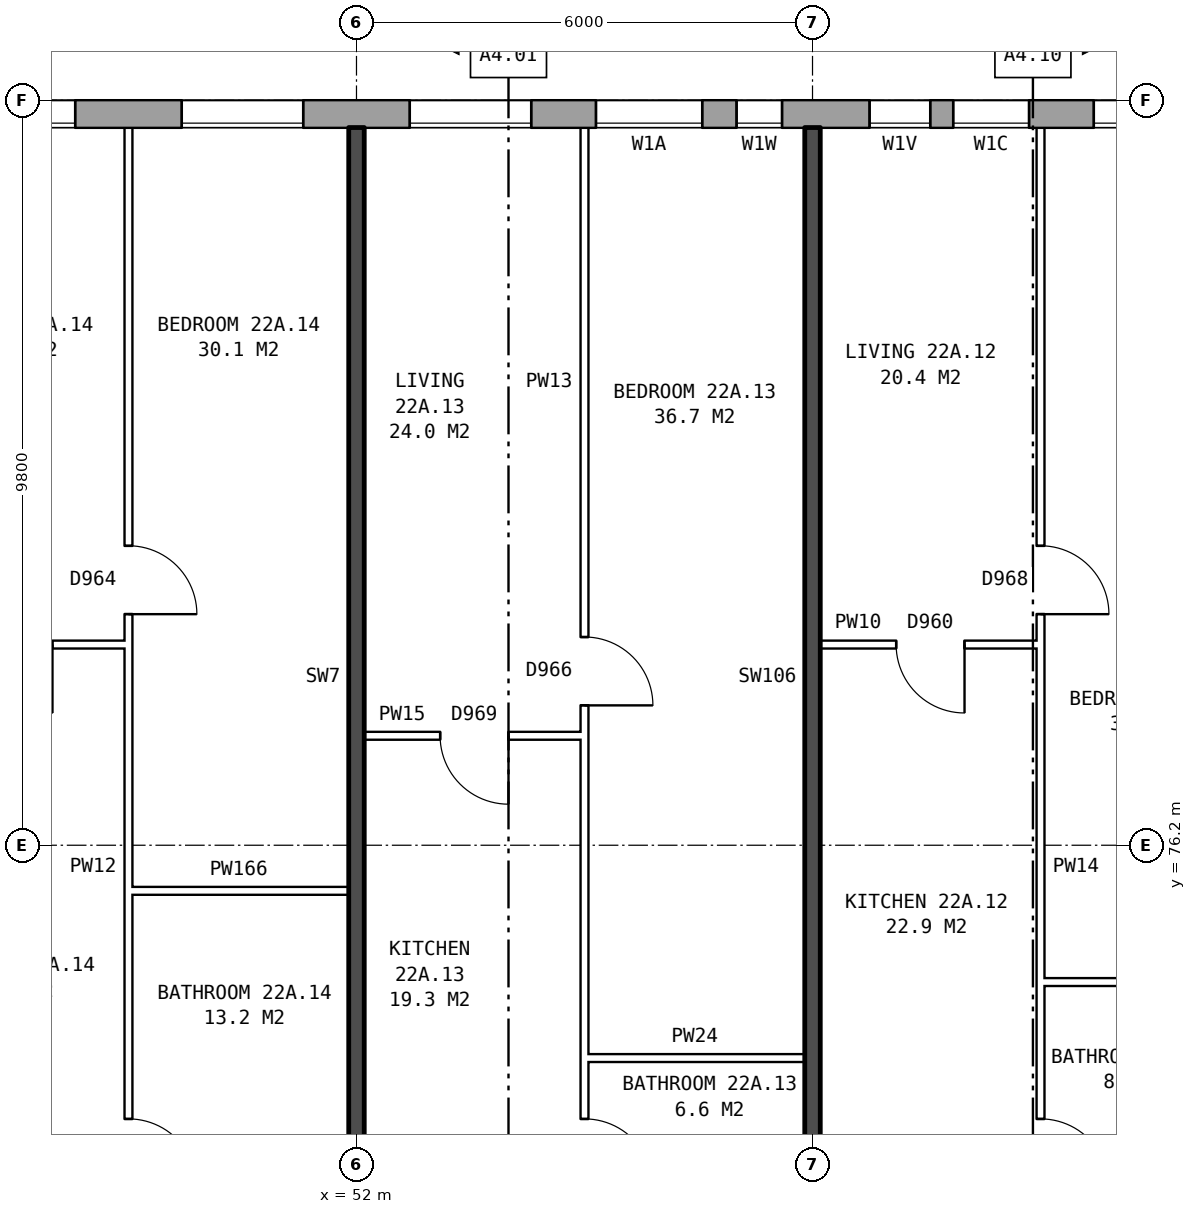
"""IFC4 building model, lengths in metres.
Left out: names, types, materials, properties, quantities, classifications, styles, units other than length and angle.
Written with IfcOpenShell. Run it as: python <this file> out.ifc"""

import sys

from ifc_helpers import new_model, si_unit, direction, frame, frame_2d, origin, place, context, subcontext, project, spatial, rectangle, extrude, element, fill, save


model = new_model("IFC4")
c1 = context("Model", 3, precision=1e-05, world=origin(), true_north=direction((0.0, 1.0)))
c2 = subcontext(c1, "Body", "Model", "MODEL_VIEW")
j1 = project(units=[si_unit("LENGTHUNIT", "METRE"), si_unit("PLANEANGLEUNIT", "RADIAN")], contexts=[c1])
p1 = place(None, origin())
s1 = spatial("IfcSite", under=j1, at=p1, CompositionType="ELEMENT")
p2 = place(p1, origin())
s2 = spatial("IfcBuilding", under=s1, at=p2, CompositionType="ELEMENT")
p3 = place(p2, frame((0.0, 0.0, 80.9)))
s3 = spatial("IfcBuildingStorey", under=s2, at=p3, CompositionType="ELEMENT", Elevation=80.9)
p4 = place(p3, frame((72.925, 85.82, 0.0), z_axis=(0.0, 0.0, 1.0), x_axis=(-1.0, 0.0, 0.0)))
e1 = element("IfcWall", 1, at=p4, inside=s3, PredefinedType="STANDARD", context=c2, shape_type="SweptSolid", body=[
    extrude(rectangle(XDim=46.601, YDim=0.36, at=frame_2d((23.3, 0.0))), origin(), (0.0, 0.0, 1.0), 2.85),
])
p5 = place(p4, frame((0.625, 0.0, 0.8)))
e2 = element("IfcOpeningElement", 2, at=p5, cuts=e1, PredefinedType="OPENING", context=c2, shape_type="SweptSolid", body=[
    extrude(rectangle(XDim=1.6, YDim=1.8, at=frame_2d((0.8, 0.9))), frame((0.0, 0.19, 0.0), z_axis=(0.0, -1.0, 0.0), x_axis=(1.0, 0.0, 0.0)), (0.0, 0.0, 1.0), 0.38),
])
p6 = place(p4, frame((3.625, 0.0, 0.8)))
e3 = element("IfcOpeningElement", 3, at=p6, cuts=e1, PredefinedType="OPENING", context=c2, shape_type="SweptSolid", body=[
    extrude(rectangle(XDim=1.6, YDim=1.8, at=frame_2d((0.8, 0.9))), frame((0.0, 0.19, 0.0), z_axis=(0.0, -1.0, 0.0), x_axis=(1.0, 0.0, 0.0)), (0.0, 0.0, 1.0), 0.38),
])
p7 = place(p4, frame((6.625, 0.0, 0.8)))
e4 = element("IfcOpeningElement", 4, at=p7, cuts=e1, PredefinedType="OPENING", context=c2, shape_type="SweptSolid", body=[
    extrude(rectangle(XDim=1.6, YDim=1.8, at=frame_2d((0.8, 0.9))), frame((0.0, 0.19, 0.0), z_axis=(0.0, -1.0, 0.0), x_axis=(1.0, 0.0, 0.0)), (0.0, 0.0, 1.0), 0.38),
])
p8 = place(p4, frame((9.625, 0.0, 0.8)))
e5 = element("IfcOpeningElement", 5, at=p8, cuts=e1, PredefinedType="OPENING", context=c2, shape_type="SweptSolid", body=[
    extrude(rectangle(XDim=1.6, YDim=1.8, at=frame_2d((0.8, 0.9))), frame((0.0, 0.19, 0.0), z_axis=(0.0, -1.0, 0.0), x_axis=(1.0, 0.0, 0.0)), (0.0, 0.0, 1.0), 0.38),
])
p9 = place(p4, frame((12.075, 0.0, 0.8)))
e6 = element("IfcOpeningElement", 6, at=p9, cuts=e1, PredefinedType="OPENING", context=c2, shape_type="SweptSolid", body=[
    extrude(rectangle(XDim=1.0, YDim=1.8, at=frame_2d((0.5, 0.9))), frame((0.0, 0.19, 0.0), z_axis=(0.0, -1.0, 0.0), x_axis=(1.0, 0.0, 0.0)), (0.0, 0.0, 1.0), 0.38),
])
p10 = place(p4, frame((15.325, 0.0, 0.65)))
e7 = element("IfcOpeningElement", 7, at=p10, cuts=e1, PredefinedType="OPENING", context=c2, shape_type="SweptSolid", body=[
    extrude(rectangle(XDim=0.6, YDim=0.9, at=frame_2d((0.3, 0.45))), frame((0.0, 0.19, 0.0), z_axis=(0.0, -1.0, 0.0), x_axis=(1.0, 0.0, 0.0)), (0.0, 0.0, 1.0), 0.38),
])
p11 = place(p4, frame((18.625, 0.0, 0.8)))
e8 = element("IfcOpeningElement", 8, at=p11, cuts=e1, PredefinedType="OPENING", context=c2, shape_type="SweptSolid", body=[
    extrude(rectangle(XDim=1.6, YDim=1.8, at=frame_2d((0.8, 0.9))), frame((0.0, 0.19, 0.0), z_axis=(0.0, -1.0, 0.0), x_axis=(1.0, 0.0, 0.0)), (0.0, 0.0, 1.0), 0.38),
])
p12 = place(p4, frame((21.625, 0.0, 0.8)))
e9 = element("IfcOpeningElement", 9, at=p12, cuts=e1, PredefinedType="OPENING", context=c2, shape_type="SweptSolid", body=[
    extrude(rectangle(XDim=1.6, YDim=1.8, at=frame_2d((0.8, 0.9))), frame((0.0, 0.19, 0.0), z_axis=(0.0, -1.0, 0.0), x_axis=(1.0, 0.0, 0.0)), (0.0, 0.0, 1.0), 0.38),
])
p13 = place(p4, frame((24.625, 0.0, 0.8)))
e10 = element("IfcOpeningElement", 10, at=p13, cuts=e1, PredefinedType="OPENING", context=c2, shape_type="SweptSolid", body=[
    extrude(rectangle(XDim=1.6, YDim=1.8, at=frame_2d((0.8, 0.9))), frame((0.0, 0.19, 0.0), z_axis=(0.0, -1.0, 0.0), x_axis=(1.0, 0.0, 0.0)), (0.0, 0.0, 1.0), 0.38),
])
p14 = place(p4, frame((27.625, 0.0, 0.8)))
e11 = element("IfcOpeningElement", 11, at=p14, cuts=e1, PredefinedType="OPENING", context=c2, shape_type="SweptSolid", body=[
    extrude(rectangle(XDim=1.6, YDim=1.8, at=frame_2d((0.8, 0.9))), frame((0.0, 0.19, 0.0), z_axis=(0.0, -1.0, 0.0), x_axis=(1.0, 0.0, 0.0)), (0.0, 0.0, 1.0), 0.38),
])
p15 = place(p4, frame((29.525, 0.0, 0.8)))
e12 = element("IfcOpeningElement", 12, at=p15, cuts=e1, PredefinedType="OPENING", context=c2, shape_type="SweptSolid", body=[
    extrude(rectangle(XDim=1.2, YDim=1.2, at=frame_2d((0.6, 0.6))), frame((0.0, 0.19, 0.0), z_axis=(0.0, -1.0, 0.0), x_axis=(1.0, 0.0, 0.0)), (0.0, 0.0, 1.0), 0.38),
])
p16 = place(p4, frame((33.625, 0.0, 0.8)))
e13 = element("IfcOpeningElement", 13, at=p16, cuts=e1, PredefinedType="OPENING", context=c2, shape_type="SweptSolid", body=[
    extrude(rectangle(XDim=1.6, YDim=1.8, at=frame_2d((0.8, 0.9))), frame((0.0, 0.19, 0.0), z_axis=(0.0, -1.0, 0.0), x_axis=(1.0, 0.0, 0.0)), (0.0, 0.0, 1.0), 0.38),
])
p17 = place(p4, frame((36.625, 0.0, 0.8)))
e14 = element("IfcOpeningElement", 14, at=p17, cuts=e1, PredefinedType="OPENING", context=c2, shape_type="SweptSolid", body=[
    extrude(rectangle(XDim=1.6, YDim=1.8, at=frame_2d((0.8, 0.9))), frame((0.0, 0.19, 0.0), z_axis=(0.0, -1.0, 0.0), x_axis=(1.0, 0.0, 0.0)), (0.0, 0.0, 1.0), 0.38),
])
p18 = place(p4, frame((39.625, 0.0, 0.8)))
e15 = element("IfcOpeningElement", 15, at=p18, cuts=e1, PredefinedType="OPENING", context=c2, shape_type="SweptSolid", body=[
    extrude(rectangle(XDim=1.6, YDim=1.8, at=frame_2d((0.8, 0.9))), frame((0.0, 0.19, 0.0), z_axis=(0.0, -1.0, 0.0), x_axis=(1.0, 0.0, 0.0)), (0.0, 0.0, 1.0), 0.38),
])
p19 = place(p4, frame((42.625, 0.0, 0.8)))
e16 = element("IfcOpeningElement", 16, at=p19, cuts=e1, PredefinedType="OPENING", context=c2, shape_type="SweptSolid", body=[
    extrude(rectangle(XDim=1.6, YDim=1.8, at=frame_2d((0.8, 0.9))), frame((0.0, 0.19, 0.0), z_axis=(0.0, -1.0, 0.0), x_axis=(1.0, 0.0, 0.0)), (0.0, 0.0, 1.0), 0.38),
])
p20 = place(p4, frame((13.375, 0.0, 1.7)))
e17 = element("IfcOpeningElement", 17, at=p20, cuts=e1, PredefinedType="OPENING", context=c2, shape_type="SweptSolid", body=[
    extrude(rectangle(XDim=0.8, YDim=0.9, at=frame_2d((0.4, 0.45))), frame((0.0, 0.19, 0.0), z_axis=(0.0, -1.0, 0.0), x_axis=(1.0, 0.0, 0.0)), (0.0, 0.0, 1.0), 0.38),
])
p21 = place(p4, frame((16.375, 0.0, 0.65)))
e18 = element("IfcOpeningElement", 18, at=p21, cuts=e1, PredefinedType="OPENING", context=c2, shape_type="SweptSolid", body=[
    extrude(rectangle(XDim=1.4, YDim=1.8, at=frame_2d((0.7, 0.9))), frame((0.0, 0.19, 0.0), z_axis=(0.0, -1.0, 0.0), x_axis=(1.0, 0.0, 0.0)), (0.0, 0.0, 1.0), 0.38),
])
p22 = place(p3, frame((55.0, 73.4, 0.0), z_axis=(0.0, 0.0, 1.0), x_axis=(1.0, 0.0, 0.0)))
e19 = element("IfcWall", 19, at=p22, inside=s3, PredefinedType="PARTITIONING", context=c2, shape_type="SweptSolid", body=[
    extrude(rectangle(XDim=2.9, YDim=0.1, at=frame_2d((1.45, 0.0))), origin(), (0.0, 0.0, 1.0), 2.85),
])
p23 = place(p3, frame((61.0, 74.4, 0.0), z_axis=(0.0, 0.0, 1.0), x_axis=(1.0, 0.0, 0.0)))
e20 = element("IfcWall", 20, at=p23, inside=s3, PredefinedType="PARTITIONING", context=c2, shape_type="SweptSolid", body=[
    extrude(rectangle(XDim=2.64, YDim=0.1, at=frame_2d((1.32, 0.0))), origin(), (0.0, 0.0, 1.0), 2.85),
])
p24 = place(p3, frame((49.0, 75.6, 0.0), z_axis=(0.0, 0.0, 1.0), x_axis=(1.0, 0.0, 0.0)))
e21 = element("IfcWall", 21, at=p24, inside=s3, PredefinedType="PARTITIONING", context=c2, shape_type="SweptSolid", body=[
    extrude(rectangle(XDim=2.9, YDim=0.1, at=frame_2d((1.45, 0.0))), origin(), (0.0, 0.0, 1.0), 2.85),
])
p25 = place(p3, frame((52.1, 77.64, 0.0), z_axis=(0.0, 0.0, 1.0), x_axis=(1.0, 0.0, 0.0)))
e22 = element("IfcWall", 22, at=p25, inside=s3, PredefinedType="PARTITIONING", context=c2, shape_type="SweptSolid", body=[
    extrude(rectangle(XDim=2.9, YDim=0.1, at=frame_2d((1.45, 0.0))), origin(), (0.0, 0.0, 1.0), 2.85),
])
p26 = place(p25, frame((1.0, 0.0, 0.0)))
e23 = element("IfcOpeningElement", 23, at=p26, cuts=e22, PredefinedType="OPENING", context=c2, shape_type="SweptSolid", body=[
    extrude(rectangle(XDim=0.9, YDim=2.1, at=frame_2d((0.45, 1.05))), frame((0.0, 0.06, 0.0), z_axis=(0.0, -1.0, 0.0), x_axis=(1.0, 0.0, 0.0)), (0.0, 0.0, 1.0), 0.12),
])
p27 = place(p3, frame((46.1, 78.84, 0.0), z_axis=(0.0, 0.0, 1.0), x_axis=(1.0, 0.0, 0.0)))
e24 = element("IfcWall", 24, at=p27, inside=s3, PredefinedType="PARTITIONING", context=c2, shape_type="SweptSolid", body=[
    extrude(rectangle(XDim=2.9, YDim=0.1, at=frame_2d((1.45, 0.0))), origin(), (0.0, 0.0, 1.0), 2.85),
])
p28 = place(p27, frame((1.0, 0.0, 0.0)))
e25 = element("IfcOpeningElement", 25, at=p28, cuts=e24, PredefinedType="OPENING", context=c2, shape_type="SweptSolid", body=[
    extrude(rectangle(XDim=0.9, YDim=2.1, at=frame_2d((0.45, 1.05))), frame((0.0, 0.06, 0.0), z_axis=(0.0, -1.0, 0.0), x_axis=(1.0, 0.0, 0.0)), (0.0, 0.0, 1.0), 0.12),
])
p29 = place(p3, frame((58.1, 78.84, 0.0), z_axis=(0.0, 0.0, 1.0), x_axis=(1.0, 0.0, 0.0)))
e26 = element("IfcWall", 26, at=p29, inside=s3, PredefinedType="PARTITIONING", context=c2, shape_type="SweptSolid", body=[
    extrude(rectangle(XDim=2.9, YDim=0.1, at=frame_2d((1.45, 0.0))), origin(), (0.0, 0.0, 1.0), 2.85),
])
p30 = place(p29, frame((1.0, 0.0, 0.0)))
e27 = element("IfcOpeningElement", 27, at=p30, cuts=e26, PredefinedType="OPENING", context=c2, shape_type="SweptSolid", body=[
    extrude(rectangle(XDim=0.9, YDim=2.1, at=frame_2d((0.45, 1.05))), frame((0.0, 0.06, 0.0), z_axis=(0.0, -1.0, 0.0), x_axis=(1.0, 0.0, 0.0)), (0.0, 0.0, 1.0), 0.12),
])
p31 = place(p3, frame((49.0, 71.3, 0.0), z_axis=(0.0, 0.0, 1.0), x_axis=(0.0, 1.0, 0.0)))
e28 = element("IfcWall", 28, at=p31, inside=s3, PredefinedType="PARTITIONING", context=c2, shape_type="SweptSolid", body=[
    extrude(rectangle(XDim=14.34, YDim=0.1, at=frame_2d((7.17, 0.0))), origin(), (0.0, 0.0, 1.0), 2.85),
])
p32 = place(p31, frame((7.94, 0.0, 0.0)))
e29 = element("IfcOpeningElement", 29, at=p32, cuts=e28, PredefinedType="OPENING", context=c2, shape_type="SweptSolid", body=[
    extrude(rectangle(XDim=0.9, YDim=2.1, at=frame_2d((0.45, 1.05))), frame((0.0, 0.06, 0.0), z_axis=(0.0, -1.0, 0.0), x_axis=(1.0, 0.0, 0.0)), (0.0, 0.0, 1.0), 0.12),
])
p33 = place(p31, frame((0.4, 0.0, 0.0)))
e30 = element("IfcOpeningElement", 30, at=p33, cuts=e28, PredefinedType="OPENING", context=c2, shape_type="SweptSolid", body=[
    extrude(rectangle(XDim=0.9, YDim=2.1, at=frame_2d((0.45, 1.05))), frame((0.0, 0.06, 0.0), z_axis=(0.0, -1.0, 0.0), x_axis=(1.0, 0.0, 0.0)), (0.0, 0.0, 1.0), 0.12),
])
p34 = place(p3, frame((52.0, 71.2, 0.0), z_axis=(0.0, 0.0, 1.0), x_axis=(0.0, 1.0, 0.0)))
e31 = element("IfcWall", 31, at=p34, inside=s3, PredefinedType="SOLIDWALL", context=c2, shape_type="SweptSolid", body=[
    extrude(rectangle(XDim=14.44, YDim=0.2, at=frame_2d((7.22, 0.0))), origin(), (0.0, 0.0, 1.0), 2.85),
])
p35 = place(p3, frame((55.0, 71.3, 0.0), z_axis=(0.0, 0.0, 1.0), x_axis=(0.0, 1.0, 0.0)))
e32 = element("IfcWall", 32, at=p35, inside=s3, PredefinedType="PARTITIONING", context=c2, shape_type="SweptSolid", body=[
    extrude(rectangle(XDim=14.34, YDim=0.1, at=frame_2d((7.17, 0.0))), origin(), (0.0, 0.0, 1.0), 2.85),
])
p36 = place(p35, frame((6.74, 0.0, 0.0)))
e33 = element("IfcOpeningElement", 33, at=p36, cuts=e32, PredefinedType="OPENING", context=c2, shape_type="SweptSolid", body=[
    extrude(rectangle(XDim=0.9, YDim=2.1, at=frame_2d((0.45, 1.05))), frame((0.0, 0.06, 0.0), z_axis=(0.0, -1.0, 0.0), x_axis=(1.0, 0.0, 0.0)), (0.0, 0.0, 1.0), 0.12),
])
p37 = place(p35, frame((0.4, 0.0, 0.0)))
e34 = element("IfcOpeningElement", 34, at=p37, cuts=e32, PredefinedType="OPENING", context=c2, shape_type="SweptSolid", body=[
    extrude(rectangle(XDim=0.9, YDim=2.1, at=frame_2d((0.45, 1.05))), frame((0.0, 0.06, 0.0), z_axis=(0.0, -1.0, 0.0), x_axis=(1.0, 0.0, 0.0)), (0.0, 0.0, 1.0), 0.12),
])
p38 = place(p3, frame((58.0, 71.2, 0.0), z_axis=(0.0, 0.0, 1.0), x_axis=(0.0, 1.0, 0.0)))
e35 = element("IfcWall", 35, at=p38, inside=s3, PredefinedType="SOLIDWALL", context=c2, shape_type="SweptSolid", body=[
    extrude(rectangle(XDim=14.44, YDim=0.2, at=frame_2d((7.22, 0.0))), origin(), (0.0, 0.0, 1.0), 2.85),
])
p39 = place(p3, frame((61.0, 71.3, 0.0), z_axis=(0.0, 0.0, 1.0), x_axis=(0.0, 1.0, 0.0)))
e36 = element("IfcWall", 36, at=p39, inside=s3, PredefinedType="PARTITIONING", context=c2, shape_type="SweptSolid", body=[
    extrude(rectangle(XDim=14.34, YDim=0.1, at=frame_2d((7.17, 0.0))), origin(), (0.0, 0.0, 1.0), 2.85),
])
p40 = place(p39, frame((7.94, 0.0, 0.0)))
e37 = element("IfcOpeningElement", 37, at=p40, cuts=e36, PredefinedType="OPENING", context=c2, shape_type="SweptSolid", body=[
    extrude(rectangle(XDim=0.9, YDim=2.1, at=frame_2d((0.45, 1.05))), frame((0.0, 0.06, 0.0), z_axis=(0.0, -1.0, 0.0), x_axis=(1.0, 0.0, 0.0)), (0.0, 0.0, 1.0), 0.12),
])
p41 = place(p39, frame((0.4, 0.0, 0.0)))
e38 = element("IfcOpeningElement", 38, at=p41, cuts=e36, PredefinedType="OPENING", context=c2, shape_type="SweptSolid", body=[
    extrude(rectangle(XDim=0.9, YDim=2.1, at=frame_2d((0.45, 1.05))), frame((0.0, 0.06, 0.0), z_axis=(0.0, -1.0, 0.0), x_axis=(1.0, 0.0, 0.0)), (0.0, 0.0, 1.0), 0.12),
])
p42 = place(p8, origin())
e39 = element("IfcWindow", 39, at=p42, inside=s3, PartitioningType="SINGLE_PANEL", PredefinedType="WINDOW", context=c2, shape_type="SweptSolid", body=[
    extrude(rectangle(XDim=1.6, YDim=1.8, at=frame_2d((0.8, 0.9))), frame((0.0, 0.15, 0.0), z_axis=(0.0, -1.0, 0.0), x_axis=(1.0, 0.0, 0.0)), (0.0, 0.0, 1.0), 0.06),
])
fill(e5, e39)
p43 = place(p9, origin())
e40 = element("IfcWindow", 40, at=p43, inside=s3, PartitioningType="SINGLE_PANEL", PredefinedType="WINDOW", context=c2, shape_type="SweptSolid", body=[
    extrude(rectangle(XDim=1.0, YDim=1.8, at=frame_2d((0.5, 0.9))), frame((0.0, 0.15, 0.0), z_axis=(0.0, -1.0, 0.0), x_axis=(1.0, 0.0, 0.0)), (0.0, 0.0, 1.0), 0.06),
])
fill(e6, e40)
p44 = place(p10, origin())
e41 = element("IfcWindow", 41, at=p44, inside=s3, PartitioningType="SINGLE_PANEL", PredefinedType="WINDOW", context=c2, shape_type="SweptSolid", body=[
    extrude(rectangle(XDim=0.6, YDim=0.9, at=frame_2d((0.3, 0.45))), frame((0.0, 0.15, 0.0), z_axis=(0.0, -1.0, 0.0), x_axis=(1.0, 0.0, 0.0)), (0.0, 0.0, 1.0), 0.06),
])
fill(e7, e41)
p45 = place(p11, origin())
e42 = element("IfcWindow", 42, at=p45, inside=s3, PartitioningType="SINGLE_PANEL", PredefinedType="WINDOW", context=c2, shape_type="SweptSolid", body=[
    extrude(rectangle(XDim=1.6, YDim=1.8, at=frame_2d((0.8, 0.9))), frame((0.0, 0.15, 0.0), z_axis=(0.0, -1.0, 0.0), x_axis=(1.0, 0.0, 0.0)), (0.0, 0.0, 1.0), 0.06),
])
fill(e8, e42)
p46 = place(p12, origin())
e43 = element("IfcWindow", 43, at=p46, inside=s3, PartitioningType="SINGLE_PANEL", PredefinedType="WINDOW", context=c2, shape_type="SweptSolid", body=[
    extrude(rectangle(XDim=1.6, YDim=1.8, at=frame_2d((0.8, 0.9))), frame((0.0, 0.15, 0.0), z_axis=(0.0, -1.0, 0.0), x_axis=(1.0, 0.0, 0.0)), (0.0, 0.0, 1.0), 0.06),
])
fill(e9, e43)
p47 = place(p13, origin())
e44 = element("IfcWindow", 44, at=p47, inside=s3, PartitioningType="SINGLE_PANEL", PredefinedType="WINDOW", context=c2, shape_type="SweptSolid", body=[
    extrude(rectangle(XDim=1.6, YDim=1.8, at=frame_2d((0.8, 0.9))), frame((0.0, 0.15, 0.0), z_axis=(0.0, -1.0, 0.0), x_axis=(1.0, 0.0, 0.0)), (0.0, 0.0, 1.0), 0.06),
])
fill(e10, e44)
p48 = place(p40, frame((0.9, 0.0, 0.0), z_axis=(0.0, 0.0, 1.0), x_axis=(-1.0, 0.0, 0.0)))
e45 = element("IfcDoor", 45, at=p48, inside=s3, OperationType="SINGLE_SWING_RIGHT", PredefinedType="DOOR", context=c2, shape_type="SweptSolid", body=[
    extrude(rectangle(XDim=0.9, YDim=2.1, at=frame_2d((0.45, 1.05))), frame((0.0, 0.025, 0.0), z_axis=(0.0, -1.0, 0.0), x_axis=(1.0, 0.0, 0.0)), (0.0, 0.0, 1.0), 0.05),
])
fill(e37, e45)
p49 = place(p30, frame((0.9, 0.0, 0.0), z_axis=(0.0, 0.0, 1.0), x_axis=(-1.0, 0.0, 0.0)))
e46 = element("IfcDoor", 46, at=p49, inside=s3, OperationType="SINGLE_SWING_LEFT", PredefinedType="DOOR", context=c2, shape_type="SweptSolid", body=[
    extrude(rectangle(XDim=0.9, YDim=2.1, at=frame_2d((0.45, 1.05))), frame((0.0, 0.025, 0.0), z_axis=(0.0, -1.0, 0.0), x_axis=(1.0, 0.0, 0.0)), (0.0, 0.0, 1.0), 0.05),
])
fill(e27, e46)
p50 = place(p41, frame((0.9, 0.0, 0.0), z_axis=(0.0, 0.0, 1.0), x_axis=(-1.0, 0.0, 0.0)))
e47 = element("IfcDoor", 47, at=p50, inside=s3, OperationType="SINGLE_SWING_RIGHT", PredefinedType="DOOR", context=c2, shape_type="SweptSolid", body=[
    extrude(rectangle(XDim=0.9, YDim=2.1, at=frame_2d((0.45, 1.05))), frame((0.0, 0.025, 0.0), z_axis=(0.0, -1.0, 0.0), x_axis=(1.0, 0.0, 0.0)), (0.0, 0.0, 1.0), 0.05),
])
fill(e38, e47)
p51 = place(p36, frame((0.9, 0.0, 0.0), z_axis=(0.0, 0.0, 1.0), x_axis=(-1.0, 0.0, 0.0)))
e48 = element("IfcDoor", 48, at=p51, inside=s3, OperationType="SINGLE_SWING_RIGHT", PredefinedType="DOOR", context=c2, shape_type="SweptSolid", body=[
    extrude(rectangle(XDim=0.9, YDim=2.1, at=frame_2d((0.45, 1.05))), frame((0.0, 0.025, 0.0), z_axis=(0.0, -1.0, 0.0), x_axis=(1.0, 0.0, 0.0)), (0.0, 0.0, 1.0), 0.05),
])
fill(e33, e48)
p52 = place(p26, frame((0.9, 0.0, 0.0), z_axis=(0.0, 0.0, 1.0), x_axis=(-1.0, 0.0, 0.0)))
e49 = element("IfcDoor", 49, at=p52, inside=s3, OperationType="SINGLE_SWING_LEFT", PredefinedType="DOOR", context=c2, shape_type="SweptSolid", body=[
    extrude(rectangle(XDim=0.9, YDim=2.1, at=frame_2d((0.45, 1.05))), frame((0.0, 0.025, 0.0), z_axis=(0.0, -1.0, 0.0), x_axis=(1.0, 0.0, 0.0)), (0.0, 0.0, 1.0), 0.05),
])
fill(e23, e49)
p53 = place(p37, frame((0.9, 0.0, 0.0), z_axis=(0.0, 0.0, 1.0), x_axis=(-1.0, 0.0, 0.0)))
e50 = element("IfcDoor", 50, at=p53, inside=s3, OperationType="SINGLE_SWING_RIGHT", PredefinedType="DOOR", context=c2, shape_type="SweptSolid", body=[
    extrude(rectangle(XDim=0.9, YDim=2.1, at=frame_2d((0.45, 1.05))), frame((0.0, 0.025, 0.0), z_axis=(0.0, -1.0, 0.0), x_axis=(1.0, 0.0, 0.0)), (0.0, 0.0, 1.0), 0.05),
])
fill(e34, e50)
p54 = place(p32, frame((0.9, 0.0, 0.0), z_axis=(0.0, 0.0, 1.0), x_axis=(-1.0, 0.0, 0.0)))
e51 = element("IfcDoor", 51, at=p54, inside=s3, OperationType="SINGLE_SWING_RIGHT", PredefinedType="DOOR", context=c2, shape_type="SweptSolid", body=[
    extrude(rectangle(XDim=0.9, YDim=2.1, at=frame_2d((0.45, 1.05))), frame((0.0, 0.025, 0.0), z_axis=(0.0, -1.0, 0.0), x_axis=(1.0, 0.0, 0.0)), (0.0, 0.0, 1.0), 0.05),
])
fill(e29, e51)
p55 = place(p33, frame((0.9, 0.0, 0.0), z_axis=(0.0, 0.0, 1.0), x_axis=(-1.0, 0.0, 0.0)))
e52 = element("IfcDoor", 52, at=p55, inside=s3, OperationType="SINGLE_SWING_RIGHT", PredefinedType="DOOR", context=c2, shape_type="SweptSolid", body=[
    extrude(rectangle(XDim=0.9, YDim=2.1, at=frame_2d((0.45, 1.05))), frame((0.0, 0.025, 0.0), z_axis=(0.0, -1.0, 0.0), x_axis=(1.0, 0.0, 0.0)), (0.0, 0.0, 1.0), 0.05),
])
fill(e30, e52)
p56 = place(p20, origin())
e53 = element("IfcWindow", 53, at=p56, inside=s3, PartitioningType="SINGLE_PANEL", PredefinedType="WINDOW", context=c2, shape_type="SweptSolid", body=[
    extrude(rectangle(XDim=0.8, YDim=0.9, at=frame_2d((0.4, 0.45))), frame((0.0, 0.15, 0.0), z_axis=(0.0, -1.0, 0.0), x_axis=(1.0, 0.0, 0.0)), (0.0, 0.0, 1.0), 0.06),
])
fill(e17, e53)
p57 = place(p21, origin())
e54 = element("IfcWindow", 54, at=p57, inside=s3, PartitioningType="SINGLE_PANEL", PredefinedType="WINDOW", context=c2, shape_type="SweptSolid", body=[
    extrude(rectangle(XDim=1.4, YDim=1.8, at=frame_2d((0.7, 0.9))), frame((0.0, 0.15, 0.0), z_axis=(0.0, -1.0, 0.0), x_axis=(1.0, 0.0, 0.0)), (0.0, 0.0, 1.0), 0.06),
])
fill(e18, e54)
save(model, sys.argv[1])
